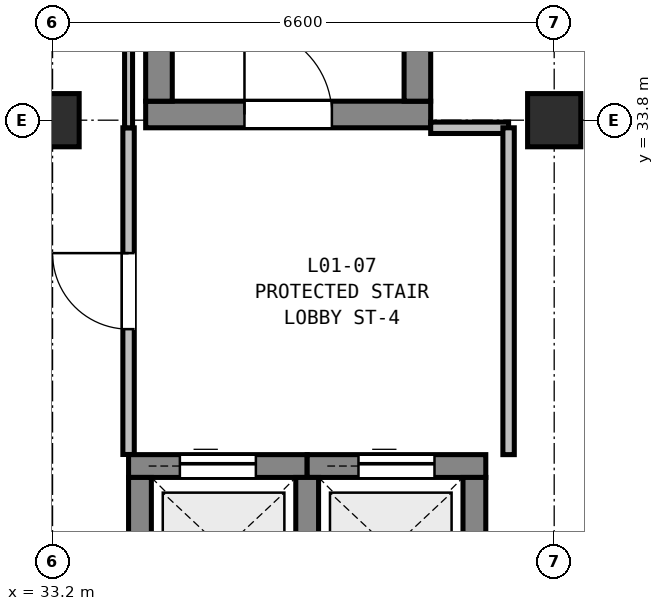
"""IFC4 building model, lengths in metres.
Left out: names, types, materials, properties, quantities, classifications, styles, units other than length and angle.
Written with IfcOpenShell. Run it as: python <this file> out.ifc"""

import sys

from ifc_helpers import new_model, si_unit, direction, frame, frame_2d, origin, origin_2d, place, context, subcontext, project, spatial, rectangle, extrude, element, fill, save


model = new_model("IFC4")
c1 = context("Model", 3, precision=1e-05, world=origin(), true_north=direction((0.0, 1.0)))
c2 = subcontext(c1, "Body", "Model", "MODEL_VIEW")
j1 = project(units=[si_unit("LENGTHUNIT", "METRE"), si_unit("PLANEANGLEUNIT", "RADIAN")], contexts=[c1])
p1 = place(None, origin())
s1 = spatial("IfcSite", under=j1, at=p1, CompositionType="ELEMENT")
p2 = place(p1, origin())
s2 = spatial("IfcBuilding", under=s1, at=p2, CompositionType="ELEMENT")
p3 = place(p2, frame((0.0, 0.0, 5.4)))
s3 = spatial("IfcBuildingStorey", under=s2, at=p3, CompositionType="ELEMENT", Elevation=5.4)
for number, where, z_axis, x_axis in (
    (1, (33.2, 33.8, 0.0), (0.0, 0.0, 1.0), (1.0, 0.0, 0.0)),
    (2, (39.8, 33.8, 0.0), (0.0, 0.0, 1.0), (1.0, 0.0, 0.0)),
):
    element("IfcColumn", number, at=place(p3, frame(where, z_axis=z_axis, x_axis=x_axis)), inside=s3, PredefinedType="COLUMN", context=c2, shape_type="SweptSolid", body=[
        extrude(rectangle(XDim=0.7, YDim=0.7, at=origin_2d()), origin(), (0.0, 0.0, 1.0), 4.8),
    ])
p4 = place(p3, frame((34.425, 33.875, 0.0), z_axis=(0.0, 0.0, 1.0), x_axis=(1.0, 0.0, 0.0)))
e3 = element("IfcWall", 3, at=p4, inside=s3, PredefinedType="SHEAR", context=c2, shape_type="SweptSolid", body=[
    extrude(rectangle(XDim=3.75, YDim=0.35, at=frame_2d((1.875, 0.0))), origin(), (0.0, 0.0, 1.0), 4.8),
])
p5 = place(p4, frame((1.3, 0.0, 0.0)))
e4 = element("IfcOpeningElement", 4, at=p5, cuts=e3, PredefinedType="OPENING", context=c2, shape_type="SweptSolid", body=[
    extrude(rectangle(XDim=1.15, YDim=2.15, at=frame_2d((0.575, 1.075))), frame((0.0, 0.185, 0.0), z_axis=(0.0, -1.0, 0.0), x_axis=(1.0, 0.0, 0.0)), (0.0, 0.0, 1.0), 0.37),
])
for number, where, z_axis, x_axis in (
    (5, (34.6, 34.05, 0.0), (0.0, 0.0, 1.0), (0.0, 1.0, 0.0)),
    (6, (38.0, 34.05, 0.0), (0.0, 0.0, 1.0), (0.0, 1.0, 0.0)),
):
    element("IfcWall", number, at=place(p3, frame(where, z_axis=z_axis, x_axis=x_axis)), inside=s3, PredefinedType="SHEAR", context=c2, shape_type="SweptSolid", body=[
        extrude(rectangle(XDim=7.275, YDim=0.35, at=frame_2d((3.637, 0.0))), origin(), (0.0, 0.0, 1.0), 4.8),
    ])
p6 = place(p3, frame((34.2, 29.25, 0.0), z_axis=(0.0, 0.0, 1.0), x_axis=(1.0, 0.0, 0.0)))
e7 = element("IfcWall", 7, at=p6, inside=s3, PredefinedType="SHEAR", context=c2, shape_type="SweptSolid", body=[
    extrude(rectangle(XDim=2.35, YDim=0.3, at=frame_2d((1.175, 0.0))), origin(), (0.0, 0.0, 1.0), 4.8),
])
p7 = place(p6, frame((0.675, 0.0, 0.0)))
e8 = element("IfcOpeningElement", 8, at=p7, cuts=e7, PredefinedType="OPENING", context=c2, shape_type="SweptSolid", body=[
    extrude(rectangle(XDim=1.0, YDim=2.1, at=frame_2d((0.5, 1.05))), frame((0.0, 0.16, 0.0), z_axis=(0.0, -1.0, 0.0), x_axis=(1.0, 0.0, 0.0)), (0.0, 0.0, 1.0), 0.32),
])
p8 = place(p3, frame((36.55, 29.25, 0.0), z_axis=(0.0, 0.0, 1.0), x_axis=(1.0, 0.0, 0.0)))
e9 = element("IfcWall", 9, at=p8, inside=s3, PredefinedType="SHEAR", context=c2, shape_type="SweptSolid", body=[
    extrude(rectangle(XDim=2.35, YDim=0.3, at=frame_2d((1.175, 0.0))), origin(), (0.0, 0.0, 1.0), 4.8),
])
p9 = place(p8, frame((0.675, 0.0, 0.0)))
e10 = element("IfcOpeningElement", 10, at=p9, cuts=e9, PredefinedType="OPENING", context=c2, shape_type="SweptSolid", body=[
    extrude(rectangle(XDim=1.0, YDim=2.1, at=frame_2d((0.5, 1.05))), frame((0.0, 0.16, 0.0), z_axis=(0.0, -1.0, 0.0), x_axis=(1.0, 0.0, 0.0)), (0.0, 0.0, 1.0), 0.32),
])
for number, where, z_axis, x_axis in (
    (11, (34.35, 27.2, 0.0), (0.0, 0.0, 1.0), (0.0, 1.0, 0.0)),
    (12, (36.55, 27.2, 0.0), (0.0, 0.0, 1.0), (0.0, 1.0, 0.0)),
    (13, (38.75, 27.2, 0.0), (0.0, 0.0, 1.0), (0.0, 1.0, 0.0)),
):
    element("IfcWall", number, at=place(p3, frame(where, z_axis=z_axis, x_axis=x_axis)), inside=s3, PredefinedType="SHEAR", context=c2, shape_type="SweptSolid", body=[
        extrude(rectangle(XDim=1.9, YDim=0.3, at=frame_2d((0.95, 0.0))), origin(), (0.0, 0.0, 1.0), 4.8),
    ])
p10 = place(p3, frame((38.175, 33.7, 0.0), z_axis=(0.0, 0.0, 1.0), x_axis=(1.0, 0.0, 0.0)))
e14 = element("IfcWall", 14, at=p10, inside=s3, PredefinedType="PARTITIONING", context=c2, shape_type="SweptSolid", body=[
    extrude(rectangle(XDim=1.025, YDim=0.15, at=frame_2d((0.512, 0.0))), origin(), (0.0, 0.0, 1.0), 4.135),
])
p11 = place(p3, frame((39.2, 33.7, 0.0), z_axis=(0.0, 0.0, 1.0), x_axis=(0.0, -1.0, 0.0)))
e15 = element("IfcWall", 15, at=p11, inside=s3, PredefinedType="PARTITIONING", context=c2, shape_type="SweptSolid", body=[
    extrude(rectangle(XDim=4.3, YDim=0.15, at=frame_2d((2.15, 0.0))), origin(), (0.0, 0.0, 1.0), 4.135),
])
p12 = place(p3, frame((34.2, 29.402, 0.0), z_axis=(0.0, 0.0, 1.0), x_axis=(0.0, 1.0, 0.0)))
e16 = element("IfcWall", 16, at=p12, inside=s3, PredefinedType="PARTITIONING", context=c2, shape_type="SweptSolid", body=[
    extrude(rectangle(XDim=4.298, YDim=0.15, at=frame_2d((2.149, 0.0))), origin(), (0.0, 0.0, 1.0), 4.135),
])
p13 = place(p12, frame((1.649, 0.0, 0.0)))
e17 = element("IfcOpeningElement", 17, at=p13, cuts=e16, PredefinedType="OPENING", context=c2, shape_type="SweptSolid", body=[
    extrude(rectangle(XDim=1.0, YDim=2.1, at=frame_2d((0.5, 1.05))), frame((0.0, 0.085, 0.0), z_axis=(0.0, -1.0, 0.0), x_axis=(1.0, 0.0, 0.0)), (0.0, 0.0, 1.0), 0.17),
])
p14 = place(p3, frame((34.2, 33.7, 0.0), z_axis=(0.0, 0.0, 1.0), x_axis=(0.0, 1.0, 0.0)))
e18 = element("IfcWall", 18, at=p14, inside=s3, PredefinedType="PARTITIONING", context=c2, shape_type="SweptSolid", body=[
    extrude(rectangle(XDim=8.3, YDim=0.105, at=frame_2d((4.15, 0.0))), origin(), (0.0, 0.0, 1.0), 4.085),
])
p15 = place(p5, origin())
e19 = element("IfcDoor", 19, at=p15, inside=s3, OperationType="SINGLE_SWING_LEFT", PredefinedType="DOOR", context=c2, shape_type="SweptSolid", body=[
    extrude(rectangle(XDim=1.15, YDim=2.15, at=frame_2d((0.575, 1.075))), frame((0.0, 0.025, 0.0), z_axis=(0.0, -1.0, 0.0), x_axis=(1.0, 0.0, 0.0)), (0.0, 0.0, 1.0), 0.05),
])
fill(e4, e19)
p16 = place(p7, origin())
e20 = element("IfcDoor", 20, at=p16, inside=s3, OperationType="SLIDING_TO_LEFT", PredefinedType="DOOR", context=c2, shape_type="SweptSolid", body=[
    extrude(rectangle(XDim=1.0, YDim=2.1, at=frame_2d((0.5, 1.05))), frame((0.0, 0.025, 0.0), z_axis=(0.0, -1.0, 0.0), x_axis=(1.0, 0.0, 0.0)), (0.0, 0.0, 1.0), 0.05),
])
fill(e8, e20)
p17 = place(p9, origin())
e21 = element("IfcDoor", 21, at=p17, inside=s3, OperationType="SLIDING_TO_LEFT", PredefinedType="DOOR", context=c2, shape_type="SweptSolid", body=[
    extrude(rectangle(XDim=1.0, YDim=2.1, at=frame_2d((0.5, 1.05))), frame((0.0, 0.025, 0.0), z_axis=(0.0, -1.0, 0.0), x_axis=(1.0, 0.0, 0.0)), (0.0, 0.0, 1.0), 0.05),
])
fill(e10, e21)
p18 = place(p13, origin())
e22 = element("IfcDoor", 22, at=p18, inside=s3, OperationType="SINGLE_SWING_RIGHT", PredefinedType="DOOR", context=c2, shape_type="SweptSolid", body=[
    extrude(rectangle(XDim=1.0, YDim=2.1, at=frame_2d((0.5, 1.05))), frame((0.0, 0.025, 0.0), z_axis=(0.0, -1.0, 0.0), x_axis=(1.0, 0.0, 0.0)), (0.0, 0.0, 1.0), 0.05),
])
fill(e17, e22)
save(model, sys.argv[1])
